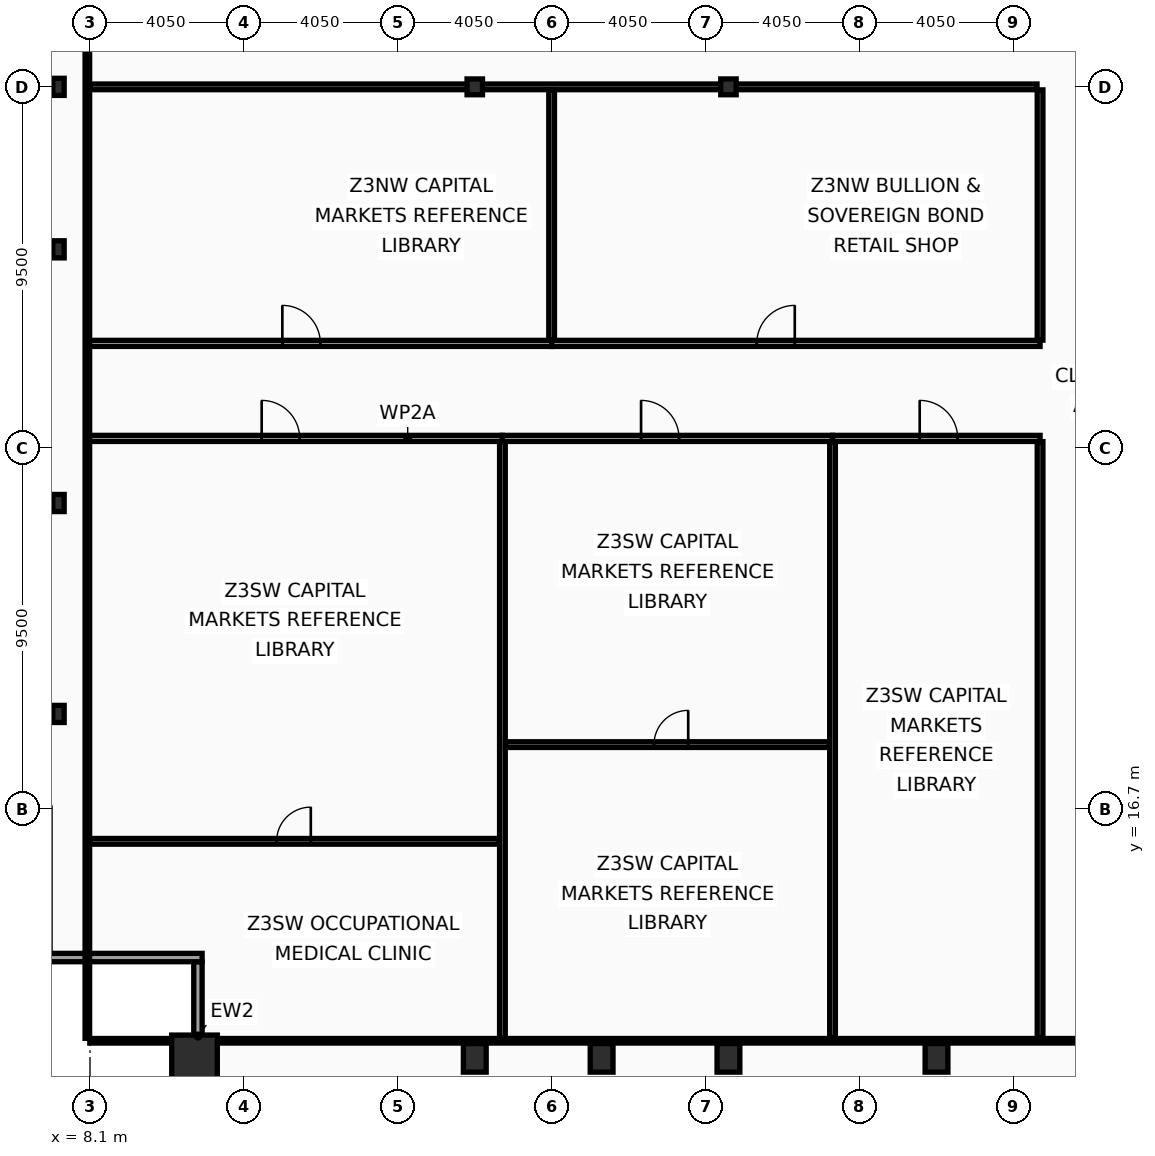
"""IFC4 building model, lengths in metres.
Left out: names, types, materials, properties, quantities, classifications, styles, units other than length and angle.
Written with IfcOpenShell. Run it as: python <this file> out.ifc"""

import sys

from ifc_helpers import new_model, si_unit, direction, frame, frame_2d, origin, origin_2d, place, context, subcontext, project, spatial, rectangle, hollow_rectangle, i_section, extrude, element, fill, save


model = new_model("IFC4")
c1 = context("Model", 3, precision=1e-05, world=origin(), true_north=direction((0.0, 1.0)))
c2 = subcontext(c1, "Body", "Model", "MODEL_VIEW")
j1 = project(units=[si_unit("LENGTHUNIT", "METRE"), si_unit("PLANEANGLEUNIT", "RADIAN")], contexts=[c1])
p1 = place(None, origin())
s1 = spatial("IfcSite", under=j1, at=p1, CompositionType="ELEMENT")
p2 = place(p1, origin())
s2 = spatial("IfcBuilding", under=s1, at=p2, CompositionType="ELEMENT")
p3 = place(p2, frame((0.0, 0.0, 203.0)))
s3 = spatial("IfcBuildingStorey", under=s2, at=p3, CompositionType="ELEMENT", Elevation=203.0)
p4 = place(p3, frame((10.85, 10.15, 0.0), z_axis=(0.0, 0.0, 1.0), x_axis=(1.0, 0.0, 0.0)))
e1 = element("IfcColumn", 1, at=p4, inside=s3, PredefinedType="COLUMN", context=c2, shape_type="SweptSolid", body=[
    extrude(hollow_rectangle(XDim=1.2, YDim=1.2, WallThickness=0.06, at=origin_2d()), origin(), (0.0, 0.0, 1.0), 3.6),
])
for number, where, z_axis, x_axis in (
    (2, (18.225, 10.15, 0.0), (0.0, 0.0, 1.0), (1.0, 0.0, 0.0)),
    (3, (21.562, 10.15, 0.0), (0.0, 0.0, 1.0), (1.0, 0.0, 0.0)),
    (4, (24.9, 10.15, 0.0), (0.0, 0.0, 1.0), (1.0, 0.0, 0.0)),
    (5, (30.375, 10.15, 0.0), (0.0, 0.0, 1.0), (1.0, 0.0, 0.0)),
):
    element("IfcColumn", number, at=place(p3, frame(where, z_axis=z_axis, x_axis=x_axis)), inside=s3, PredefinedType="COLUMN", context=c2, shape_type="SweptSolid", body=[
        extrude(hollow_rectangle(XDim=0.6, YDim=0.75, WallThickness=0.045, at=origin_2d()), origin(), (0.0, 0.0, 1.0), 3.6),
    ])
for number, where, z_axis, x_axis in (
    (6, (7.27, 19.2, 0.0), (0.0, 0.0, 1.0), (1.0, 0.0, 0.0)),
    (7, (7.27, 24.75, 0.0), (0.0, 0.0, 1.0), (1.0, 0.0, 0.0)),
    (8, (7.27, 31.425, 0.0), (0.0, 0.0, 1.0), (1.0, 0.0, 0.0)),
    (9, (7.27, 35.7, 0.0), (0.0, 0.0, 1.0), (1.0, 0.0, 0.0)),
):
    element("IfcColumn", number, at=place(p3, frame(where, z_axis=z_axis, x_axis=x_axis)), inside=s3, PredefinedType="COLUMN", context=c2, shape_type="SweptSolid", body=[
        extrude(i_section(OverallWidth=0.3, OverallDepth=0.45, WebThickness=0.014, FlangeThickness=0.026, at=origin_2d()), origin(), (0.0, 0.0, 1.0), 3.6),
    ])
for number, where, z_axis, x_axis in (
    (10, (18.225, 35.7, 0.0), (0.0, 0.0, 1.0), (1.0, 0.0, 0.0)),
    (11, (24.9, 35.7, 0.0), (0.0, 0.0, 1.0), (1.0, 0.0, 0.0)),
):
    element("IfcColumn", number, at=place(p3, frame(where, z_axis=z_axis, x_axis=x_axis)), inside=s3, PredefinedType="COLUMN", context=c2, shape_type="SweptSolid", body=[
        extrude(i_section(OverallWidth=0.406, OverallDepth=0.416, WebThickness=0.03, FlangeThickness=0.048, at=origin_2d()), origin(), (0.0, 0.0, 1.0), 3.6),
    ])
p5 = place(p3, frame((10.94, 8.77, 0.0), z_axis=(0.0, 0.0, 1.0), x_axis=(0.0, 1.0, 0.0)))
e12 = element("IfcWall", 12, at=p5, inside=s3, PredefinedType="SOLIDWALL", context=c2, shape_type="SweptSolid", body=[
    extrude(rectangle(XDim=3.91, YDim=0.22, at=frame_2d((1.955, 0.0))), origin(), (0.0, 0.0, 1.0), 2.83),
])
p6 = place(p3, frame((11.05, 12.79, 0.0), z_axis=(0.0, 0.0, 1.0), x_axis=(-1.0, 0.0, 0.0)))
e13 = element("IfcWall", 13, at=p6, inside=s3, PredefinedType="SOLIDWALL", context=c2, shape_type="SweptSolid", body=[
    extrude(rectangle(XDim=4.22, YDim=0.22, at=frame_2d((2.11, 0.0))), origin(), (0.0, 0.0, 1.0), 2.83),
])
p7 = place(p3, frame((33.1, 10.665, 0.0), z_axis=(0.0, 0.0, 1.0), x_axis=(0.0, 1.0, 0.0)))
e14 = element("IfcWall", 14, at=p7, inside=s3, PredefinedType="PARTITIONING", context=c2, shape_type="SweptSolid", body=[
    extrude(rectangle(XDim=15.7, YDim=0.15, at=frame_2d((7.85, 0.0))), origin(), (0.0, 0.0, 1.0), 2.98),
])
p8 = place(p3, frame((33.1, 29.035, 0.0), z_axis=(0.0, 0.0, 1.0), x_axis=(0.0, 1.0, 0.0)))
e15 = element("IfcWall", 15, at=p8, inside=s3, PredefinedType="PARTITIONING", context=c2, shape_type="SweptSolid", body=[
    extrude(rectangle(XDim=6.585, YDim=0.15, at=frame_2d((3.292, 0.0))), origin(), (0.0, 0.0, 1.0), 2.98),
])
p9 = place(p3, frame((8.095, 35.7, 0.0), z_axis=(0.0, 0.0, 1.0), x_axis=(1.0, 0.0, 0.0)))
e16 = element("IfcWall", 16, at=p9, inside=s3, PredefinedType="PARTITIONING", context=c2, shape_type="SweptSolid", body=[
    extrude(rectangle(XDim=24.925, YDim=0.15, at=frame_2d((12.462, 0.0))), origin(), (0.0, 0.0, 1.0), 2.73),
])
p10 = place(p3, frame((8.03, 26.45, 0.0), z_axis=(0.0, 0.0, 1.0), x_axis=(1.0, 0.0, 0.0)))
e17 = element("IfcWall", 17, at=p10, inside=s3, PredefinedType="PARTITIONING", context=c2, shape_type="SweptSolid", body=[
    extrude(rectangle(XDim=10.922, YDim=0.16, at=frame_2d((5.461, 0.0))), origin(), (0.0, 0.0, 1.0), 2.73),
])
p11 = place(p10, frame((4.587, 0.0, 0.0)))
e18 = element("IfcOpeningElement", 18, at=p11, cuts=e17, PredefinedType="OPENING", context=c2, shape_type="SweptSolid", body=[
    extrude(rectangle(XDim=1.0, YDim=2.05, at=frame_2d((0.5, 1.025))), frame((0.0, 0.09, 0.0), z_axis=(0.0, -1.0, 0.0), x_axis=(1.0, 0.0, 0.0)), (0.0, 0.0, 1.0), 0.18),
])
p12 = place(p3, frame((8.095, 15.848, 0.0), z_axis=(0.0, 0.0, 1.0), x_axis=(1.0, 0.0, 0.0)))
e19 = element("IfcWall", 19, at=p12, inside=s3, PredefinedType="PARTITIONING", context=c2, shape_type="SweptSolid", body=[
    extrude(rectangle(XDim=10.777, YDim=0.15, at=frame_2d((5.389, 0.0))), origin(), (0.0, 0.0, 1.0), 2.73),
])
p13 = place(p12, frame((4.915, 0.0, 0.0)))
e20 = element("IfcOpeningElement", 20, at=p13, cuts=e19, PredefinedType="OPENING", context=c2, shape_type="SweptSolid", body=[
    extrude(rectangle(XDim=0.9, YDim=2.05, at=frame_2d((0.45, 1.025))), frame((0.0, 0.085, 0.0), z_axis=(0.0, -1.0, 0.0), x_axis=(1.0, 0.0, 0.0)), (0.0, 0.0, 1.0), 0.17),
])
p14 = place(p3, frame((18.952, 26.45, 0.0), z_axis=(0.0, 0.0, 1.0), x_axis=(1.0, 0.0, 0.0)))
e21 = element("IfcWall", 21, at=p14, inside=s3, PredefinedType="PARTITIONING", context=c2, shape_type="SweptSolid", body=[
    extrude(rectangle(XDim=8.687, YDim=0.16, at=frame_2d((4.343, 0.0))), origin(), (0.0, 0.0, 1.0), 2.73),
])
p15 = place(p14, frame((3.648, 0.0, 0.0)))
e22 = element("IfcOpeningElement", 22, at=p15, cuts=e21, PredefinedType="OPENING", context=c2, shape_type="SweptSolid", body=[
    extrude(rectangle(XDim=1.0, YDim=2.05, at=frame_2d((0.5, 1.025))), frame((0.0, 0.09, 0.0), z_axis=(0.0, -1.0, 0.0), x_axis=(1.0, 0.0, 0.0)), (0.0, 0.0, 1.0), 0.18),
])
p16 = place(p3, frame((18.952, 10.665, 0.0), z_axis=(0.0, 0.0, 1.0), x_axis=(0.0, 1.0, 0.0)))
e23 = element("IfcWall", 23, at=p16, inside=s3, PredefinedType="PARTITIONING", context=c2, shape_type="SweptSolid", body=[
    extrude(rectangle(XDim=15.7, YDim=0.15, at=frame_2d((7.85, 0.0))), origin(), (0.0, 0.0, 1.0), 2.98),
])
p17 = place(p3, frame((19.032, 18.393, 0.0), z_axis=(0.0, 0.0, 1.0), x_axis=(1.0, 0.0, 0.0)))
e24 = element("IfcWall", 24, at=p17, inside=s3, PredefinedType="PARTITIONING", context=c2, shape_type="SweptSolid", body=[
    extrude(rectangle(XDim=8.527, YDim=0.15, at=frame_2d((4.263, 0.0))), origin(), (0.0, 0.0, 1.0), 2.73),
])
p18 = place(p17, frame((3.909, 0.0, 0.0)))
e25 = element("IfcOpeningElement", 25, at=p18, cuts=e24, PredefinedType="OPENING", context=c2, shape_type="SweptSolid", body=[
    extrude(rectangle(XDim=0.9, YDim=2.05, at=frame_2d((0.45, 1.025))), frame((0.0, 0.085, 0.0), z_axis=(0.0, -1.0, 0.0), x_axis=(1.0, 0.0, 0.0)), (0.0, 0.0, 1.0), 0.17),
])
p19 = place(p3, frame((27.639, 26.45, 0.0), z_axis=(0.0, 0.0, 1.0), x_axis=(1.0, 0.0, 0.0)))
e26 = element("IfcWall", 26, at=p19, inside=s3, PredefinedType="PARTITIONING", context=c2, shape_type="SweptSolid", body=[
    extrude(rectangle(XDim=5.461, YDim=0.16, at=frame_2d((2.73, 0.0))), origin(), (0.0, 0.0, 1.0), 2.73),
])
p20 = place(p19, frame((2.294, 0.0, 0.0)))
e27 = element("IfcOpeningElement", 27, at=p20, cuts=e26, PredefinedType="OPENING", context=c2, shape_type="SweptSolid", body=[
    extrude(rectangle(XDim=1.0, YDim=2.05, at=frame_2d((0.5, 1.025))), frame((0.0, 0.09, 0.0), z_axis=(0.0, -1.0, 0.0), x_axis=(1.0, 0.0, 0.0)), (0.0, 0.0, 1.0), 0.18),
])
p21 = place(p3, frame((27.639, 10.665, 0.0), z_axis=(0.0, 0.0, 1.0), x_axis=(0.0, 1.0, 0.0)))
e28 = element("IfcWall", 28, at=p21, inside=s3, PredefinedType="PARTITIONING", context=c2, shape_type="SweptSolid", body=[
    extrude(rectangle(XDim=15.7, YDim=0.15, at=frame_2d((7.85, 0.0))), origin(), (0.0, 0.0, 1.0), 2.98),
])
p22 = place(p3, frame((8.03, 28.95, 0.0), z_axis=(0.0, 0.0, 1.0), x_axis=(1.0, 0.0, 0.0)))
e29 = element("IfcWall", 29, at=p22, inside=s3, PredefinedType="PARTITIONING", context=c2, shape_type="SweptSolid", body=[
    extrude(rectangle(XDim=12.217, YDim=0.16, at=frame_2d((6.108, 0.0))), origin(), (0.0, 0.0, 1.0), 2.73),
])
p23 = place(p22, frame((5.131, 0.0, 0.0)))
e30 = element("IfcOpeningElement", 30, at=p23, cuts=e29, PredefinedType="OPENING", context=c2, shape_type="SweptSolid", body=[
    extrude(rectangle(XDim=1.0, YDim=2.05, at=frame_2d((0.5, 1.025))), frame((0.0, 0.09, 0.0), z_axis=(0.0, -1.0, 0.0), x_axis=(1.0, 0.0, 0.0)), (0.0, 0.0, 1.0), 0.18),
])
p24 = place(p3, frame((20.247, 28.95, 0.0), z_axis=(0.0, 0.0, 1.0), x_axis=(1.0, 0.0, 0.0)))
e31 = element("IfcWall", 31, at=p24, inside=s3, PredefinedType="PARTITIONING", context=c2, shape_type="SweptSolid", body=[
    extrude(rectangle(XDim=12.853, YDim=0.16, at=frame_2d((6.427, 0.0))), origin(), (0.0, 0.0, 1.0), 2.73),
])
p25 = place(p24, frame((5.398, 0.0, 0.0)))
e32 = element("IfcOpeningElement", 32, at=p25, cuts=e31, PredefinedType="OPENING", context=c2, shape_type="SweptSolid", body=[
    extrude(rectangle(XDim=1.0, YDim=2.05, at=frame_2d((0.5, 1.025))), frame((0.0, 0.09, 0.0), z_axis=(0.0, -1.0, 0.0), x_axis=(1.0, 0.0, 0.0)), (0.0, 0.0, 1.0), 0.18),
])
p26 = place(p3, frame((20.247, 29.035, 0.0), z_axis=(0.0, 0.0, 1.0), x_axis=(0.0, 1.0, 0.0)))
e33 = element("IfcWall", 33, at=p26, inside=s3, PredefinedType="PARTITIONING", context=c2, shape_type="SweptSolid", body=[
    extrude(rectangle(XDim=6.585, YDim=0.15, at=frame_2d((3.292, 0.0))), origin(), (0.0, 0.0, 1.0), 2.98),
])
p27 = place(p3, frame((8.03, 10.665, 0.0), z_axis=(0.0, 0.0, 1.0), x_axis=(0.0, 1.0, 0.0)))
e34 = element("IfcWall", 34, at=p27, inside=s3, PredefinedType="PARTITIONING", context=c2, shape_type="SweptSolid", body=[
    extrude(rectangle(XDim=42.11, YDim=0.12, at=frame_2d((21.055, 0.0))), origin(), (0.0, 0.0, 1.0), 2.73),
])
p28 = place(p3, frame((8.095, 10.6, 0.0), z_axis=(0.0, 0.0, 1.0), x_axis=(1.0, 0.0, 0.0)))
e35 = element("IfcWall", 35, at=p28, inside=s3, PredefinedType="PARTITIONING", context=c2, shape_type="SweptSolid", body=[
    extrude(rectangle(XDim=56.71, YDim=0.12, at=frame_2d((28.355, 0.0))), origin(), (0.0, 0.0, 1.0), 2.73),
])
p29 = place(p11, origin())
e36 = element("IfcDoor", 36, at=p29, inside=s3, OperationType="SINGLE_SWING_LEFT", PredefinedType="DOOR", context=c2, shape_type="SweptSolid", body=[
    extrude(rectangle(XDim=1.0, YDim=2.05, at=frame_2d((0.5, 1.025))), frame((0.0, 0.025, 0.0), z_axis=(0.0, -1.0, 0.0), x_axis=(1.0, 0.0, 0.0)), (0.0, 0.0, 1.0), 0.05),
])
fill(e18, e36)
p30 = place(p13, origin())
e37 = element("IfcDoor", 37, at=p30, inside=s3, OperationType="SINGLE_SWING_RIGHT", PredefinedType="DOOR", context=c2, shape_type="SweptSolid", body=[
    extrude(rectangle(XDim=0.9, YDim=2.05, at=frame_2d((0.45, 1.025))), frame((0.0, 0.025, 0.0), z_axis=(0.0, -1.0, 0.0), x_axis=(1.0, 0.0, 0.0)), (0.0, 0.0, 1.0), 0.05),
])
fill(e20, e37)
p31 = place(p15, origin())
e38 = element("IfcDoor", 38, at=p31, inside=s3, OperationType="SINGLE_SWING_LEFT", PredefinedType="DOOR", context=c2, shape_type="SweptSolid", body=[
    extrude(rectangle(XDim=1.0, YDim=2.05, at=frame_2d((0.5, 1.025))), frame((0.0, 0.025, 0.0), z_axis=(0.0, -1.0, 0.0), x_axis=(1.0, 0.0, 0.0)), (0.0, 0.0, 1.0), 0.05),
])
fill(e22, e38)
p32 = place(p18, origin())
e39 = element("IfcDoor", 39, at=p32, inside=s3, OperationType="SINGLE_SWING_RIGHT", PredefinedType="DOOR", context=c2, shape_type="SweptSolid", body=[
    extrude(rectangle(XDim=0.9, YDim=2.05, at=frame_2d((0.45, 1.025))), frame((0.0, 0.025, 0.0), z_axis=(0.0, -1.0, 0.0), x_axis=(1.0, 0.0, 0.0)), (0.0, 0.0, 1.0), 0.05),
])
fill(e25, e39)
p33 = place(p20, origin())
e40 = element("IfcDoor", 40, at=p33, inside=s3, OperationType="SINGLE_SWING_LEFT", PredefinedType="DOOR", context=c2, shape_type="SweptSolid", body=[
    extrude(rectangle(XDim=1.0, YDim=2.05, at=frame_2d((0.5, 1.025))), frame((0.0, 0.025, 0.0), z_axis=(0.0, -1.0, 0.0), x_axis=(1.0, 0.0, 0.0)), (0.0, 0.0, 1.0), 0.05),
])
fill(e27, e40)
p34 = place(p23, origin())
e41 = element("IfcDoor", 41, at=p34, inside=s3, OperationType="SINGLE_SWING_LEFT", PredefinedType="DOOR", context=c2, shape_type="SweptSolid", body=[
    extrude(rectangle(XDim=1.0, YDim=2.05, at=frame_2d((0.5, 1.025))), frame((0.0, 0.025, 0.0), z_axis=(0.0, -1.0, 0.0), x_axis=(1.0, 0.0, 0.0)), (0.0, 0.0, 1.0), 0.05),
])
fill(e30, e41)
p35 = place(p25, origin())
e42 = element("IfcDoor", 42, at=p35, inside=s3, OperationType="SINGLE_SWING_RIGHT", PredefinedType="DOOR", context=c2, shape_type="SweptSolid", body=[
    extrude(rectangle(XDim=1.0, YDim=2.05, at=frame_2d((0.5, 1.025))), frame((0.0, 0.025, 0.0), z_axis=(0.0, -1.0, 0.0), x_axis=(1.0, 0.0, 0.0)), (0.0, 0.0, 1.0), 0.05),
])
fill(e32, e42)
save(model, sys.argv[1])
